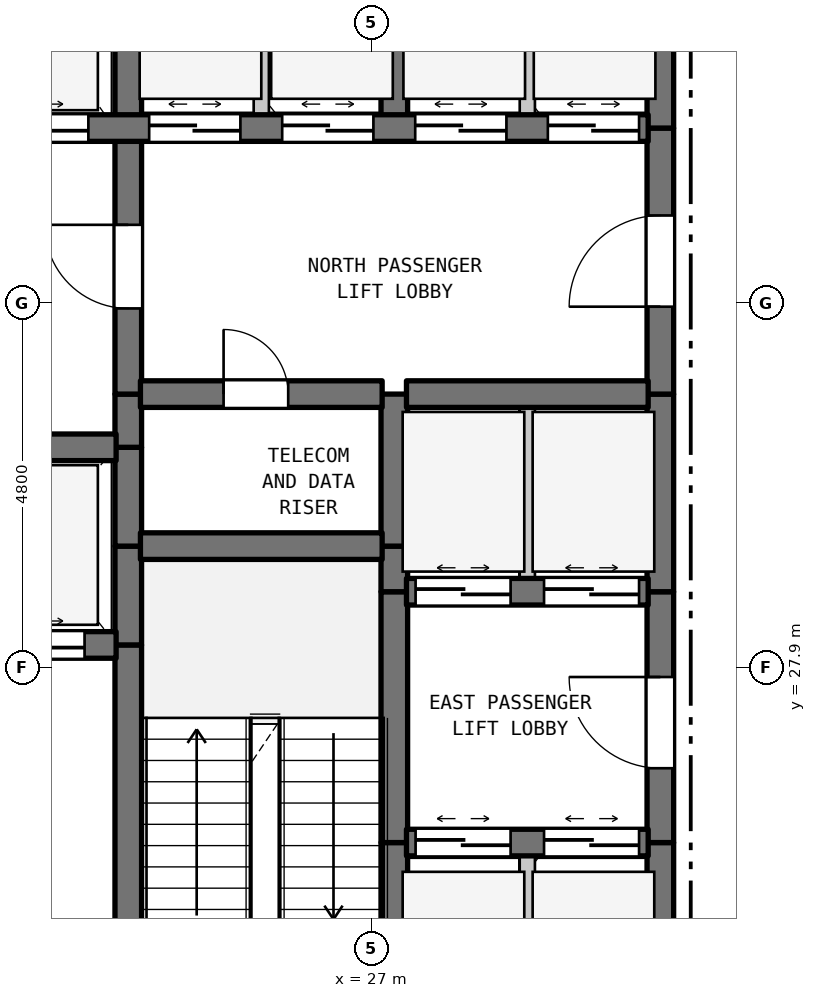
"""IFC4 building model, lengths in metres.
Left out: names, types, materials, properties, quantities, classifications, styles, units other than length and angle.
Written with IfcOpenShell. Run it as: python <this file> out.ifc"""

import sys

from ifc_helpers import new_model, si_unit, direction, frame, frame_2d, origin, place, context, subcontext, project, spatial, rectangle, extrude, element, fill, save


model = new_model("IFC4")
c1 = context("Model", 3, precision=1e-05, world=origin(), true_north=direction((0.0, 1.0)))
c2 = subcontext(c1, "Body", "Model", "MODEL_VIEW")
j1 = project(units=[si_unit("LENGTHUNIT", "METRE"), si_unit("PLANEANGLEUNIT", "RADIAN")], contexts=[c1])
p1 = place(None, origin())
s1 = spatial("IfcSite", under=j1, at=p1, CompositionType="ELEMENT")
p2 = place(p1, origin())
s2 = spatial("IfcBuilding", under=s1, at=p2, CompositionType="ELEMENT")
p3 = place(p2, frame((0.0, 0.0, 53.6)))
s3 = spatial("IfcBuildingStorey", under=s2, at=p3, CompositionType="ELEMENT", Elevation=53.6)
p4 = place(p3, frame((23.8, 22.7, 0.0), z_axis=(0.0, 0.0, 1.0), x_axis=(0.0, 1.0, 0.0)))
e1 = element("IfcWall", 1, at=p4, inside=s3, PredefinedType="SHEAR", context=c2, shape_type="SweptSolid", body=[
    extrude(rectangle(XDim=5.5, YDim=0.35, at=frame_2d((2.75, 0.0))), origin(), (0.0, 0.0, 1.0), 3.385),
])
p5 = place(p4, frame((0.235, 0.0, 0.0)))
e2 = element("IfcOpeningElement", 2, at=p5, cuts=e1, PredefinedType="OPENING", context=c2, shape_type="SweptSolid", body=[
    extrude(rectangle(XDim=1.1, YDim=2.15, at=frame_2d((0.55, 1.075))), frame((0.0, 0.185, 0.0), z_axis=(0.0, -1.0, 0.0), x_axis=(1.0, 0.0, 0.0)), (0.0, 0.0, 1.0), 0.37),
])
for number, where, z_axis, x_axis in (
    (3, (23.8, 28.2, 0.0), (0.0, 0.0, 1.0), (0.0, 1.0, 0.0)),
    (4, (23.8, 29.5, 0.0), (0.0, 0.0, 1.0), (0.0, 1.0, 0.0)),
):
    element("IfcWall", number, at=place(p3, frame(where, z_axis=z_axis, x_axis=x_axis)), inside=s3, PredefinedType="SHEAR", context=c2, shape_type="SweptSolid", body=[
        extrude(rectangle(XDim=1.3, YDim=0.35, at=frame_2d((0.65, 0.0))), origin(), (0.0, 0.0, 1.0), 3.385),
    ])
p6 = place(p3, frame((23.8, 30.8, 0.0), z_axis=(0.0, 0.0, 1.0), x_axis=(0.0, 1.0, 0.0)))
e5 = element("IfcWall", 5, at=p6, inside=s3, PredefinedType="SHEAR", context=c2, shape_type="SweptSolid", body=[
    extrude(rectangle(XDim=0.7, YDim=0.35, at=frame_2d((0.35, 0.0))), origin(), (0.0, 0.0, 1.0), 3.385),
])
p7 = place(p3, frame((23.8, 31.5, 0.0), z_axis=(0.0, 0.0, 1.0), x_axis=(0.0, 1.0, 0.0)))
e6 = element("IfcWall", 6, at=p7, inside=s3, PredefinedType="SHEAR", context=c2, shape_type="SweptSolid", body=[
    extrude(rectangle(XDim=3.5, YDim=0.35, at=frame_2d((1.75, 0.0))), origin(), (0.0, 0.0, 1.0), 3.385),
])
p8 = place(p7, frame((1.127, 0.0, 0.0)))
e7 = element("IfcOpeningElement", 7, at=p8, cuts=e6, PredefinedType="OPENING", context=c2, shape_type="SweptSolid", body=[
    extrude(rectangle(XDim=1.1, YDim=2.15, at=frame_2d((0.55, 1.075))), frame((0.0, 0.185, 0.0), z_axis=(0.0, -1.0, 0.0), x_axis=(1.0, 0.0, 0.0)), (0.0, 0.0, 1.0), 0.37),
])
p9 = place(p3, frame((23.8, 35.0, 0.0), z_axis=(0.0, 0.0, 1.0), x_axis=(0.0, 1.0, 0.0)))
e8 = element("IfcWall", 8, at=p9, inside=s3, PredefinedType="SHEAR", context=c2, shape_type="SweptSolid", body=[
    extrude(rectangle(XDim=2.9, YDim=0.35, at=frame_2d((1.45, 0.0))), origin(), (0.0, 0.0, 1.0), 3.385),
])
p10 = place(p3, frame((25.55, 35.0, 0.0), z_axis=(0.0, 0.0, 1.0), x_axis=(0.0, 1.0, 0.0)))
e9 = element("IfcWall", 9, at=p10, inside=s3, PredefinedType="STANDARD", context=c2, shape_type="SweptSolid", body=[
    extrude(rectangle(XDim=2.9, YDim=0.2, at=frame_2d((1.45, 0.0))), origin(), (0.0, 0.0, 1.0), 3.385),
])
p11 = place(p3, frame((27.3, 22.7, 0.0), z_axis=(0.0, 0.0, 1.0), x_axis=(0.0, 1.0, 0.0)))
e10 = element("IfcWall", 10, at=p11, inside=s3, PredefinedType="SHEAR", context=c2, shape_type="SweptSolid", body=[
    extrude(rectangle(XDim=2.9, YDim=0.35, at=frame_2d((1.45, 0.0))), origin(), (0.0, 0.0, 1.0), 3.385),
])
p12 = place(p3, frame((27.3, 25.6, 0.0), z_axis=(0.0, 0.0, 1.0), x_axis=(0.0, 1.0, 0.0)))
e11 = element("IfcWall", 11, at=p12, inside=s3, PredefinedType="SHEAR", context=c2, shape_type="SweptSolid", body=[
    extrude(rectangle(XDim=3.3, YDim=0.35, at=frame_2d((1.65, 0.0))), origin(), (0.0, 0.0, 1.0), 3.385),
])
p13 = place(p3, frame((27.3, 28.9, 0.0), z_axis=(0.0, 0.0, 1.0), x_axis=(0.0, 1.0, 0.0)))
e12 = element("IfcWall", 12, at=p13, inside=s3, PredefinedType="SHEAR", context=c2, shape_type="SweptSolid", body=[
    extrude(rectangle(XDim=0.6, YDim=0.35, at=frame_2d((0.3, 0.0))), origin(), (0.0, 0.0, 1.0), 3.385),
])
p14 = place(p3, frame((27.3, 29.5, 0.0), z_axis=(0.0, 0.0, 1.0), x_axis=(0.0, 1.0, 0.0)))
e13 = element("IfcWall", 13, at=p14, inside=s3, PredefinedType="SHEAR", context=c2, shape_type="SweptSolid", body=[
    extrude(rectangle(XDim=2.0, YDim=0.35, at=frame_2d((1.0, 0.0))), origin(), (0.0, 0.0, 1.0), 3.385),
])
p15 = place(p3, frame((27.3, 35.0, 0.0), z_axis=(0.0, 0.0, 1.0), x_axis=(0.0, 1.0, 0.0)))
e14 = element("IfcWall", 14, at=p15, inside=s3, PredefinedType="SHEAR", context=c2, shape_type="SweptSolid", body=[
    extrude(rectangle(XDim=2.9, YDim=0.35, at=frame_2d((1.45, 0.0))), origin(), (0.0, 0.0, 1.0), 3.385),
])
p16 = place(p3, frame((29.05, 22.7, 0.0), z_axis=(0.0, 0.0, 1.0), x_axis=(0.0, 1.0, 0.0)))
e15 = element("IfcWall", 15, at=p16, inside=s3, PredefinedType="STANDARD", context=c2, shape_type="SweptSolid", body=[
    extrude(rectangle(XDim=2.9, YDim=0.2, at=frame_2d((1.45, 0.0))), origin(), (0.0, 0.0, 1.0), 3.385),
])
p17 = place(p3, frame((29.05, 28.9, 0.0), z_axis=(0.0, 0.0, 1.0), x_axis=(0.0, 1.0, 0.0)))
e16 = element("IfcWall", 16, at=p17, inside=s3, PredefinedType="STANDARD", context=c2, shape_type="SweptSolid", body=[
    extrude(rectangle(XDim=2.6, YDim=0.2, at=frame_2d((1.3, 0.0))), origin(), (0.0, 0.0, 1.0), 3.385),
])
p18 = place(p3, frame((29.05, 35.0, 0.0), z_axis=(0.0, 0.0, 1.0), x_axis=(0.0, 1.0, 0.0)))
e17 = element("IfcWall", 17, at=p18, inside=s3, PredefinedType="STANDARD", context=c2, shape_type="SweptSolid", body=[
    extrude(rectangle(XDim=2.9, YDim=0.2, at=frame_2d((1.45, 0.0))), origin(), (0.0, 0.0, 1.0), 3.385),
])
p19 = place(p3, frame((30.8, 22.7, 0.0), z_axis=(0.0, 0.0, 1.0), x_axis=(0.0, 1.0, 0.0)))
e18 = element("IfcWall", 18, at=p19, inside=s3, PredefinedType="SHEAR", context=c2, shape_type="SweptSolid", body=[
    extrude(rectangle(XDim=2.9, YDim=0.35, at=frame_2d((1.45, 0.0))), origin(), (0.0, 0.0, 1.0), 3.385),
])
p20 = place(p3, frame((30.8, 25.6, 0.0), z_axis=(0.0, 0.0, 1.0), x_axis=(0.0, 1.0, 0.0)))
e19 = element("IfcWall", 19, at=p20, inside=s3, PredefinedType="SHEAR", context=c2, shape_type="SweptSolid", body=[
    extrude(rectangle(XDim=3.3, YDim=0.35, at=frame_2d((1.65, 0.0))), origin(), (0.0, 0.0, 1.0), 3.385),
])
p21 = place(p20, frame((0.978, 0.0, 0.0)))
e20 = element("IfcOpeningElement", 20, at=p21, cuts=e19, PredefinedType="OPENING", context=c2, shape_type="SweptSolid", body=[
    extrude(rectangle(XDim=1.2, YDim=2.2, at=frame_2d((0.6, 1.1))), frame((0.0, 0.185, 0.0), z_axis=(0.0, -1.0, 0.0), x_axis=(1.0, 0.0, 0.0)), (0.0, 0.0, 1.0), 0.37),
])
p22 = place(p3, frame((30.8, 28.9, 0.0), z_axis=(0.0, 0.0, 1.0), x_axis=(0.0, 1.0, 0.0)))
e21 = element("IfcWall", 21, at=p22, inside=s3, PredefinedType="SHEAR", context=c2, shape_type="SweptSolid", body=[
    extrude(rectangle(XDim=2.6, YDim=0.35, at=frame_2d((1.3, 0.0))), origin(), (0.0, 0.0, 1.0), 3.385),
])
p23 = place(p3, frame((30.8, 31.5, 0.0), z_axis=(0.0, 0.0, 1.0), x_axis=(0.0, 1.0, 0.0)))
e22 = element("IfcWall", 22, at=p23, inside=s3, PredefinedType="SHEAR", context=c2, shape_type="SweptSolid", body=[
    extrude(rectangle(XDim=3.5, YDim=0.35, at=frame_2d((1.75, 0.0))), origin(), (0.0, 0.0, 1.0), 3.385),
])
p24 = place(p23, frame((1.15, 0.0, 0.0)))
e23 = element("IfcOpeningElement", 23, at=p24, cuts=e22, PredefinedType="OPENING", context=c2, shape_type="SweptSolid", body=[
    extrude(rectangle(XDim=1.2, YDim=2.2, at=frame_2d((0.6, 1.1))), frame((0.0, 0.185, 0.0), z_axis=(0.0, -1.0, 0.0), x_axis=(1.0, 0.0, 0.0)), (0.0, 0.0, 1.0), 0.37),
])
p25 = place(p3, frame((30.8, 35.0, 0.0), z_axis=(0.0, 0.0, 1.0), x_axis=(0.0, 1.0, 0.0)))
e24 = element("IfcWall", 24, at=p25, inside=s3, PredefinedType="SHEAR", context=c2, shape_type="SweptSolid", body=[
    extrude(rectangle(XDim=2.9, YDim=0.35, at=frame_2d((1.45, 0.0))), origin(), (0.0, 0.0, 1.0), 3.385),
])
p26 = place(p3, frame((27.46, 25.6, 0.0), z_axis=(0.0, 0.0, 1.0), x_axis=(1.0, 0.0, 0.0)))
e25 = element("IfcWall", 25, at=p26, inside=s3, PredefinedType="SHEAR", context=c2, shape_type="SweptSolid", body=[
    extrude(rectangle(XDim=3.18, YDim=0.35, at=frame_2d((1.59, 0.0))), origin(), (0.0, 0.0, 1.0), 3.385),
])
p27 = place(p26, frame((0.12, 0.0, 0.0)))
e26 = element("IfcOpeningElement", 26, at=p27, cuts=e25, PredefinedType="OPENING", context=c2, shape_type="SweptSolid", body=[
    extrude(rectangle(XDim=1.25, YDim=2.2, at=frame_2d((0.625, 1.1))), frame((0.0, 0.185, 0.0), z_axis=(0.0, -1.0, 0.0), x_axis=(1.0, 0.0, 0.0)), (0.0, 0.0, 1.0), 0.37),
])
p28 = place(p26, frame((1.81, 0.0, 0.0)))
e27 = element("IfcOpeningElement", 27, at=p28, cuts=e25, PredefinedType="OPENING", context=c2, shape_type="SweptSolid", body=[
    extrude(rectangle(XDim=1.25, YDim=2.2, at=frame_2d((0.625, 1.1))), frame((0.0, 0.185, 0.0), z_axis=(0.0, -1.0, 0.0), x_axis=(1.0, 0.0, 0.0)), (0.0, 0.0, 1.0), 0.37),
])
p29 = place(p3, frame((19.16, 28.2, 0.0), z_axis=(0.0, 0.0, 1.0), x_axis=(1.0, 0.0, 0.0)))
e28 = element("IfcWall", 28, at=p29, inside=s3, PredefinedType="SHEAR", context=c2, shape_type="SweptSolid", body=[
    extrude(rectangle(XDim=4.48, YDim=0.35, at=frame_2d((2.24, 0.0))), origin(), (0.0, 0.0, 1.0), 3.385),
])
p30 = place(p29, frame((0.415, 0.0, 0.0)))
e29 = element("IfcOpeningElement", 29, at=p30, cuts=e28, PredefinedType="OPENING", context=c2, shape_type="SweptSolid", body=[
    extrude(rectangle(XDim=1.25, YDim=2.2, at=frame_2d((0.625, 1.1))), frame((0.0, 0.185, 0.0), z_axis=(0.0, -1.0, 0.0), x_axis=(1.0, 0.0, 0.0)), (0.0, 0.0, 1.0), 0.37),
])
p31 = place(p29, frame((2.815, 0.0, 0.0)))
e30 = element("IfcOpeningElement", 30, at=p31, cuts=e28, PredefinedType="OPENING", context=c2, shape_type="SweptSolid", body=[
    extrude(rectangle(XDim=1.25, YDim=2.2, at=frame_2d((0.625, 1.1))), frame((0.0, 0.185, 0.0), z_axis=(0.0, -1.0, 0.0), x_axis=(1.0, 0.0, 0.0)), (0.0, 0.0, 1.0), 0.37),
])
p32 = place(p3, frame((27.46, 28.9, 0.0), z_axis=(0.0, 0.0, 1.0), x_axis=(1.0, 0.0, 0.0)))
e31 = element("IfcWall", 31, at=p32, inside=s3, PredefinedType="SHEAR", context=c2, shape_type="SweptSolid", body=[
    extrude(rectangle(XDim=3.18, YDim=0.35, at=frame_2d((1.59, 0.0))), origin(), (0.0, 0.0, 1.0), 3.385),
])
p33 = place(p32, frame((0.12, 0.0, 0.0)))
e32 = element("IfcOpeningElement", 32, at=p33, cuts=e31, PredefinedType="OPENING", context=c2, shape_type="SweptSolid", body=[
    extrude(rectangle(XDim=1.25, YDim=2.2, at=frame_2d((0.625, 1.1))), frame((0.0, 0.185, 0.0), z_axis=(0.0, -1.0, 0.0), x_axis=(1.0, 0.0, 0.0)), (0.0, 0.0, 1.0), 0.37),
])
p34 = place(p32, frame((1.81, 0.0, 0.0)))
e33 = element("IfcOpeningElement", 33, at=p34, cuts=e31, PredefinedType="OPENING", context=c2, shape_type="SweptSolid", body=[
    extrude(rectangle(XDim=1.25, YDim=2.2, at=frame_2d((0.625, 1.1))), frame((0.0, 0.185, 0.0), z_axis=(0.0, -1.0, 0.0), x_axis=(1.0, 0.0, 0.0)), (0.0, 0.0, 1.0), 0.37),
])
p35 = place(p3, frame((23.96, 29.5, 0.0), z_axis=(0.0, 0.0, 1.0), x_axis=(1.0, 0.0, 0.0)))
e34 = element("IfcWall", 34, at=p35, inside=s3, PredefinedType="SHEAR", context=c2, shape_type="SweptSolid", body=[
    extrude(rectangle(XDim=3.18, YDim=0.35, at=frame_2d((1.59, 0.0))), origin(), (0.0, 0.0, 1.0), 3.385),
])
p36 = place(p3, frame((19.16, 30.8, 0.0), z_axis=(0.0, 0.0, 1.0), x_axis=(1.0, 0.0, 0.0)))
e35 = element("IfcWall", 35, at=p36, inside=s3, PredefinedType="SHEAR", context=c2, shape_type="SweptSolid", body=[
    extrude(rectangle(XDim=4.48, YDim=0.35, at=frame_2d((2.24, 0.0))), origin(), (0.0, 0.0, 1.0), 3.385),
])
p37 = place(p3, frame((23.96, 31.5, 0.0), z_axis=(0.0, 0.0, 1.0), x_axis=(1.0, 0.0, 0.0)))
e36 = element("IfcWall", 36, at=p37, inside=s3, PredefinedType="SHEAR", context=c2, shape_type="SweptSolid", body=[
    extrude(rectangle(XDim=3.18, YDim=0.35, at=frame_2d((1.59, 0.0))), origin(), (0.0, 0.0, 1.0), 3.385),
])
p38 = place(p37, frame((1.094, 0.0, 0.0)))
e37 = element("IfcOpeningElement", 37, at=p38, cuts=e36, PredefinedType="OPENING", context=c2, shape_type="SweptSolid", body=[
    extrude(rectangle(XDim=0.85, YDim=2.1, at=frame_2d((0.425, 1.05))), frame((0.0, 0.185, 0.0), z_axis=(0.0, -1.0, 0.0), x_axis=(1.0, 0.0, 0.0)), (0.0, 0.0, 1.0), 0.37),
])
p39 = place(p3, frame((27.46, 31.5, 0.0), z_axis=(0.0, 0.0, 1.0), x_axis=(1.0, 0.0, 0.0)))
e38 = element("IfcWall", 38, at=p39, inside=s3, PredefinedType="SHEAR", context=c2, shape_type="SweptSolid", body=[
    extrude(rectangle(XDim=3.18, YDim=0.35, at=frame_2d((1.59, 0.0))), origin(), (0.0, 0.0, 1.0), 3.385),
])
p40 = place(p3, frame((19.16, 35.0, 0.0), z_axis=(0.0, 0.0, 1.0), x_axis=(1.0, 0.0, 0.0)))
e39 = element("IfcWall", 39, at=p40, inside=s3, PredefinedType="SHEAR", context=c2, shape_type="SweptSolid", body=[
    extrude(rectangle(XDim=11.48, YDim=0.35, at=frame_2d((5.74, 0.0))), origin(), (0.0, 0.0, 1.0), 3.385),
])
p41 = place(p40, frame((0.365, 0.0, 0.0)))
e40 = element("IfcOpeningElement", 40, at=p41, cuts=e39, PredefinedType="OPENING", context=c2, shape_type="SweptSolid", body=[
    extrude(rectangle(XDim=1.35, YDim=2.2, at=frame_2d((0.675, 1.1))), frame((0.0, 0.185, 0.0), z_axis=(0.0, -1.0, 0.0), x_axis=(1.0, 0.0, 0.0)), (0.0, 0.0, 1.0), 0.37),
])
p42 = place(p40, frame((2.765, 0.0, 0.0)))
e41 = element("IfcOpeningElement", 41, at=p42, cuts=e39, PredefinedType="OPENING", context=c2, shape_type="SweptSolid", body=[
    extrude(rectangle(XDim=1.35, YDim=2.2, at=frame_2d((0.675, 1.1))), frame((0.0, 0.185, 0.0), z_axis=(0.0, -1.0, 0.0), x_axis=(1.0, 0.0, 0.0)), (0.0, 0.0, 1.0), 0.37),
])
p43 = place(p40, frame((4.915, 0.0, 0.0)))
e42 = element("IfcOpeningElement", 42, at=p43, cuts=e39, PredefinedType="OPENING", context=c2, shape_type="SweptSolid", body=[
    extrude(rectangle(XDim=1.2, YDim=2.2, at=frame_2d((0.6, 1.1))), frame((0.0, 0.185, 0.0), z_axis=(0.0, -1.0, 0.0), x_axis=(1.0, 0.0, 0.0)), (0.0, 0.0, 1.0), 0.37),
])
p44 = place(p40, frame((6.665, 0.0, 0.0)))
e43 = element("IfcOpeningElement", 43, at=p44, cuts=e39, PredefinedType="OPENING", context=c2, shape_type="SweptSolid", body=[
    extrude(rectangle(XDim=1.2, YDim=2.2, at=frame_2d((0.6, 1.1))), frame((0.0, 0.185, 0.0), z_axis=(0.0, -1.0, 0.0), x_axis=(1.0, 0.0, 0.0)), (0.0, 0.0, 1.0), 0.37),
])
p45 = place(p40, frame((8.415, 0.0, 0.0)))
e44 = element("IfcOpeningElement", 44, at=p45, cuts=e39, PredefinedType="OPENING", context=c2, shape_type="SweptSolid", body=[
    extrude(rectangle(XDim=1.2, YDim=2.2, at=frame_2d((0.6, 1.1))), frame((0.0, 0.185, 0.0), z_axis=(0.0, -1.0, 0.0), x_axis=(1.0, 0.0, 0.0)), (0.0, 0.0, 1.0), 0.37),
])
p46 = place(p40, frame((10.16, 0.0, 0.0)))
e45 = element("IfcOpeningElement", 45, at=p46, cuts=e39, PredefinedType="OPENING", context=c2, shape_type="SweptSolid", body=[
    extrude(rectangle(XDim=1.2, YDim=2.2, at=frame_2d((0.6, 1.1))), frame((0.0, 0.185, 0.0), z_axis=(0.0, -1.0, 0.0), x_axis=(1.0, 0.0, 0.0)), (0.0, 0.0, 1.0), 0.37),
])
p47 = place(p8, origin())
e46 = element("IfcDoor", 46, at=p47, inside=s3, OperationType="SINGLE_SWING_RIGHT", PredefinedType="DOOR", context=c2, shape_type="SweptSolid", body=[
    extrude(rectangle(XDim=1.1, YDim=2.15, at=frame_2d((0.55, 1.075))), frame((0.0, 0.025, 0.0), z_axis=(0.0, -1.0, 0.0), x_axis=(1.0, 0.0, 0.0)), (0.0, 0.0, 1.0), 0.05),
])
fill(e7, e46)
p48 = place(p21, origin())
e47 = element("IfcDoor", 47, at=p48, inside=s3, OperationType="SINGLE_SWING_RIGHT", PredefinedType="DOOR", context=c2, shape_type="SweptSolid", body=[
    extrude(rectangle(XDim=1.2, YDim=2.2, at=frame_2d((0.6, 1.1))), frame((0.0, 0.025, 0.0), z_axis=(0.0, -1.0, 0.0), x_axis=(1.0, 0.0, 0.0)), (0.0, 0.0, 1.0), 0.05),
])
fill(e20, e47)
p49 = place(p24, origin())
e48 = element("IfcDoor", 48, at=p49, inside=s3, OperationType="SINGLE_SWING_LEFT", PredefinedType="DOOR", context=c2, shape_type="SweptSolid", body=[
    extrude(rectangle(XDim=1.2, YDim=2.2, at=frame_2d((0.6, 1.1))), frame((0.0, 0.025, 0.0), z_axis=(0.0, -1.0, 0.0), x_axis=(1.0, 0.0, 0.0)), (0.0, 0.0, 1.0), 0.05),
])
fill(e23, e48)
p50 = place(p27, origin())
e49 = element("IfcDoor", 49, at=p50, inside=s3, OperationType="DOUBLE_DOOR_SLIDING", PredefinedType="DOOR", context=c2, shape_type="SweptSolid", body=[
    extrude(rectangle(XDim=1.25, YDim=2.2, at=frame_2d((0.625, 1.1))), frame((0.0, 0.025, 0.0), z_axis=(0.0, -1.0, 0.0), x_axis=(1.0, 0.0, 0.0)), (0.0, 0.0, 1.0), 0.05),
])
fill(e26, e49)
p51 = place(p28, origin())
e50 = element("IfcDoor", 50, at=p51, inside=s3, OperationType="DOUBLE_DOOR_SLIDING", PredefinedType="DOOR", context=c2, shape_type="SweptSolid", body=[
    extrude(rectangle(XDim=1.25, YDim=2.2, at=frame_2d((0.625, 1.1))), frame((0.0, 0.025, 0.0), z_axis=(0.0, -1.0, 0.0), x_axis=(1.0, 0.0, 0.0)), (0.0, 0.0, 1.0), 0.05),
])
fill(e27, e50)
p52 = place(p31, origin())
e51 = element("IfcDoor", 51, at=p52, inside=s3, OperationType="DOUBLE_DOOR_SLIDING", PredefinedType="DOOR", context=c2, shape_type="SweptSolid", body=[
    extrude(rectangle(XDim=1.25, YDim=2.2, at=frame_2d((0.625, 1.1))), frame((0.0, 0.025, 0.0), z_axis=(0.0, -1.0, 0.0), x_axis=(1.0, 0.0, 0.0)), (0.0, 0.0, 1.0), 0.05),
])
fill(e30, e51)
p53 = place(p33, origin())
e52 = element("IfcDoor", 52, at=p53, inside=s3, OperationType="DOUBLE_DOOR_SLIDING", PredefinedType="DOOR", context=c2, shape_type="SweptSolid", body=[
    extrude(rectangle(XDim=1.25, YDim=2.2, at=frame_2d((0.625, 1.1))), frame((0.0, 0.025, 0.0), z_axis=(0.0, -1.0, 0.0), x_axis=(1.0, 0.0, 0.0)), (0.0, 0.0, 1.0), 0.05),
])
fill(e32, e52)
p54 = place(p34, origin())
e53 = element("IfcDoor", 53, at=p54, inside=s3, OperationType="DOUBLE_DOOR_SLIDING", PredefinedType="DOOR", context=c2, shape_type="SweptSolid", body=[
    extrude(rectangle(XDim=1.25, YDim=2.2, at=frame_2d((0.625, 1.1))), frame((0.0, 0.025, 0.0), z_axis=(0.0, -1.0, 0.0), x_axis=(1.0, 0.0, 0.0)), (0.0, 0.0, 1.0), 0.05),
])
fill(e33, e53)
p55 = place(p38, origin())
e54 = element("IfcDoor", 54, at=p55, inside=s3, OperationType="SINGLE_SWING_LEFT", PredefinedType="DOOR", context=c2, shape_type="SweptSolid", body=[
    extrude(rectangle(XDim=0.85, YDim=2.1, at=frame_2d((0.425, 1.05))), frame((0.0, 0.025, 0.0), z_axis=(0.0, -1.0, 0.0), x_axis=(1.0, 0.0, 0.0)), (0.0, 0.0, 1.0), 0.05),
])
fill(e37, e54)
p56 = place(p42, origin())
e55 = element("IfcDoor", 55, at=p56, inside=s3, OperationType="DOUBLE_DOOR_SLIDING", PredefinedType="DOOR", context=c2, shape_type="SweptSolid", body=[
    extrude(rectangle(XDim=1.35, YDim=2.2, at=frame_2d((0.675, 1.1))), frame((0.0, 0.025, 0.0), z_axis=(0.0, -1.0, 0.0), x_axis=(1.0, 0.0, 0.0)), (0.0, 0.0, 1.0), 0.05),
])
fill(e41, e55)
p57 = place(p43, origin())
e56 = element("IfcDoor", 56, at=p57, inside=s3, OperationType="DOUBLE_DOOR_SLIDING", PredefinedType="DOOR", context=c2, shape_type="SweptSolid", body=[
    extrude(rectangle(XDim=1.2, YDim=2.2, at=frame_2d((0.6, 1.1))), frame((0.0, 0.025, 0.0), z_axis=(0.0, -1.0, 0.0), x_axis=(1.0, 0.0, 0.0)), (0.0, 0.0, 1.0), 0.05),
])
fill(e42, e56)
p58 = place(p44, origin())
e57 = element("IfcDoor", 57, at=p58, inside=s3, OperationType="DOUBLE_DOOR_SLIDING", PredefinedType="DOOR", context=c2, shape_type="SweptSolid", body=[
    extrude(rectangle(XDim=1.2, YDim=2.2, at=frame_2d((0.6, 1.1))), frame((0.0, 0.025, 0.0), z_axis=(0.0, -1.0, 0.0), x_axis=(1.0, 0.0, 0.0)), (0.0, 0.0, 1.0), 0.05),
])
fill(e43, e57)
p59 = place(p45, origin())
e58 = element("IfcDoor", 58, at=p59, inside=s3, OperationType="DOUBLE_DOOR_SLIDING", PredefinedType="DOOR", context=c2, shape_type="SweptSolid", body=[
    extrude(rectangle(XDim=1.2, YDim=2.2, at=frame_2d((0.6, 1.1))), frame((0.0, 0.025, 0.0), z_axis=(0.0, -1.0, 0.0), x_axis=(1.0, 0.0, 0.0)), (0.0, 0.0, 1.0), 0.05),
])
fill(e44, e58)
p60 = place(p46, origin())
e59 = element("IfcDoor", 59, at=p60, inside=s3, OperationType="DOUBLE_DOOR_SLIDING", PredefinedType="DOOR", context=c2, shape_type="SweptSolid", body=[
    extrude(rectangle(XDim=1.2, YDim=2.2, at=frame_2d((0.6, 1.1))), frame((0.0, 0.025, 0.0), z_axis=(0.0, -1.0, 0.0), x_axis=(1.0, 0.0, 0.0)), (0.0, 0.0, 1.0), 0.05),
])
fill(e45, e59)
save(model, sys.argv[1])
